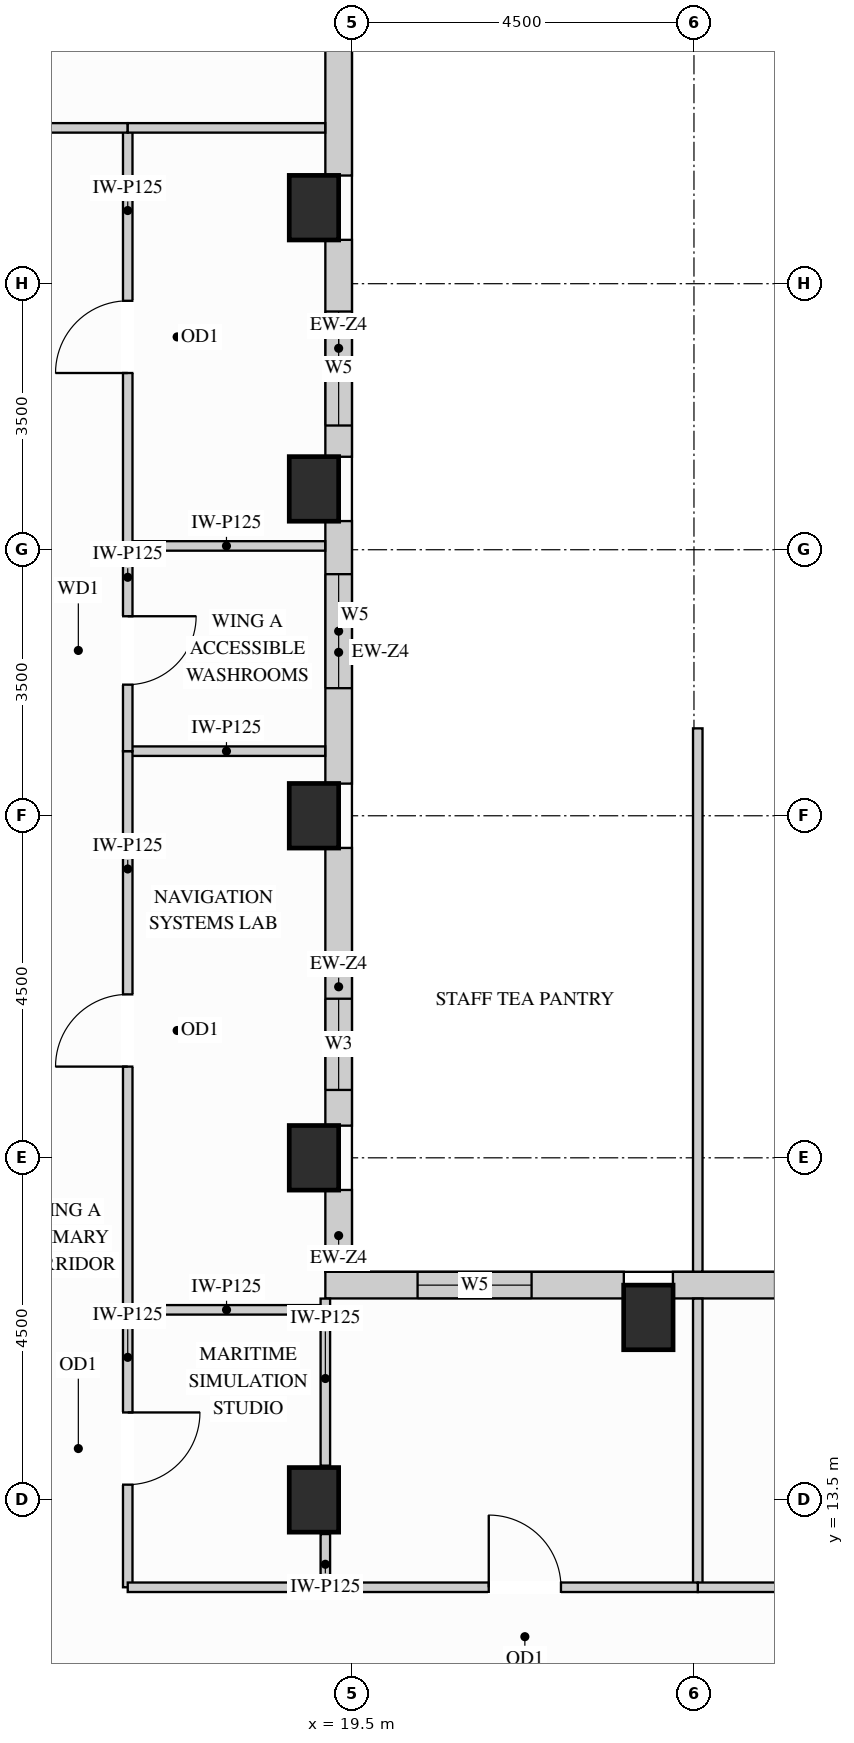
"""IFC4 building model, lengths in metres.
Left out: names, types, materials, properties, quantities, classifications, styles, units other than length and angle.
Written with IfcOpenShell. Run it as: python <this file> out.ifc"""

import sys

from ifc_helpers import new_model, si_unit, direction, frame, frame_2d, origin, origin_2d, place, context, subcontext, project, spatial, rectangle, extrude, source, transform, mapped, element, fill, save


model = new_model("IFC4")
c1 = context("Model", 3, precision=1e-05, world=origin(), true_north=direction((0.0, 1.0)))
c2 = subcontext(c1, "Body", "Model", "MODEL_VIEW")
j1 = project(units=[si_unit("LENGTHUNIT", "METRE"), si_unit("PLANEANGLEUNIT", "RADIAN")], contexts=[c1])
p1 = place(None, origin())
s1 = spatial("IfcSite", under=j1, at=p1, CompositionType="ELEMENT")
p2 = place(p1, origin())
s2 = spatial("IfcBuilding", under=s1, at=p2, CompositionType="ELEMENT")
p3 = place(p2, frame((0.0, 0.0, 234.0)))
s3 = spatial("IfcBuildingStorey", under=s2, at=p3, CompositionType="ELEMENT", Elevation=234.0)
m1 = source(origin(), c2, "Body", "SweptSolid", [
    extrude(rectangle(XDim=0.65, YDim=0.85, at=origin_2d()), origin(), (0.0, 0.0, 1.0), 3.4),
])
for number, where, z_axis, x_axis in (
    (1, (19.0, 13.5, 0.0), (0.0, 0.0, 1.0), (1.0, 0.0, 0.0)),
    (2, (19.0, 18.0, 0.0), (0.0, 0.0, 1.0), (1.0, 0.0, 0.0)),
    (3, (19.0, 22.5, 0.0), (0.0, 0.0, 1.0), (1.0, 0.0, 0.0)),
    (4, (19.0, 26.8, 0.0), (0.0, 0.0, 1.0), (1.0, 0.0, 0.0)),
    (5, (19.0, 30.5, 0.0), (0.0, 0.0, 1.0), (1.0, 0.0, 0.0)),
    (6, (23.4, 15.9, 0.0), (0.0, 0.0, 1.0), (1.0, 0.0, 0.0)),
):
    element("IfcColumn", number, at=place(p3, frame(where, z_axis=z_axis, x_axis=x_axis)), inside=s3, PredefinedType="COLUMN", context=c2, shape_type="MappedRepresentation", body=[
        mapped(m1, transform((0.0, 0.0, 0.0), x_axis=(1.0, 0.0, 0.0), y_axis=(0.0, 1.0, 0.0), z_axis=(0.0, 0.0, 1.0))),
    ])
m2 = source(origin(), c2, "Body", "SweptSolid", [
    extrude(rectangle(XDim=1.079, YDim=0.35, at=frame_2d((0.54, 0.0))), origin(), (0.0, 0.0, 1.0), 2.619),
])
p4 = place(p3, frame((19.325, 16.498, 0.0), z_axis=(0.0, 0.0, 1.0), x_axis=(0.0, 1.0, 0.0)))
e7 = element("IfcWall", 7, at=p4, inside=s3, PredefinedType="SOLIDWALL", context=c2, shape_type="MappedRepresentation", body=[
    mapped(m2, transform((0.0, 0.0, 0.0), x_axis=(1.0, 0.0, 0.0), y_axis=(0.0, 1.0, 0.0), z_axis=(0.0, 0.0, 1.0))),
])
p5 = place(p3, frame((19.325, 18.423, 0.0), z_axis=(0.0, 0.0, 1.0), x_axis=(0.0, 1.0, 0.0)))
e8 = element("IfcWall", 8, at=p5, inside=s3, PredefinedType="SOLIDWALL", context=c2, shape_type="SweptSolid", body=[
    extrude(rectangle(XDim=3.654, YDim=0.35, at=frame_2d((1.827, 0.0))), origin(), (0.0, 0.0, 1.0), 2.619),
])
p6 = place(p5, frame((0.47, 0.0, 0.78)))
e9 = element("IfcOpeningElement", 9, at=p6, cuts=e8, PredefinedType="OPENING", context=c2, shape_type="SweptSolid", body=[
    extrude(rectangle(XDim=1.2, YDim=1.659, at=frame_2d((0.6, 0.83))), frame((0.0, 0.185, 0.0), z_axis=(0.0, -1.0, 0.0), x_axis=(1.0, 0.0, 0.0)), (0.0, 0.0, 1.0), 0.37),
])
p7 = place(p3, frame((19.325, 22.923, 0.0), z_axis=(0.0, 0.0, 1.0), x_axis=(0.0, 1.0, 0.0)))
e10 = element("IfcWall", 10, at=p7, inside=s3, PredefinedType="SOLIDWALL", context=c2, shape_type="SweptSolid", body=[
    extrude(rectangle(XDim=3.454, YDim=0.35, at=frame_2d((1.727, 0.0))), origin(), (0.0, 0.0, 1.0), 2.619),
])
p8 = place(p7, frame((1.256, 0.0, 0.78)))
e11 = element("IfcOpeningElement", 11, at=p8, cuts=e10, PredefinedType="OPENING", context=c2, shape_type="SweptSolid", body=[
    extrude(rectangle(XDim=1.5, YDim=1.659, at=frame_2d((0.75, 0.83))), frame((0.0, 0.185, 0.0), z_axis=(0.0, -1.0, 0.0), x_axis=(1.0, 0.0, 0.0)), (0.0, 0.0, 1.0), 0.37),
])
p9 = place(p3, frame((19.325, 27.223, 0.0), z_axis=(0.0, 0.0, 1.0), x_axis=(0.0, 1.0, 0.0)))
e12 = element("IfcWall", 12, at=p9, inside=s3, PredefinedType="SOLIDWALL", context=c2, shape_type="SweptSolid", body=[
    extrude(rectangle(XDim=2.854, YDim=0.35, at=frame_2d((1.427, 0.0))), origin(), (0.0, 0.0, 1.0), 2.619),
])
p10 = place(p9, frame((0.411, 0.0, 0.78)))
e13 = element("IfcOpeningElement", 13, at=p10, cuts=e12, PredefinedType="OPENING", context=c2, shape_type="SweptSolid", body=[
    extrude(rectangle(XDim=1.5, YDim=1.659, at=frame_2d((0.75, 0.83))), frame((0.0, 0.185, 0.0), z_axis=(0.0, -1.0, 0.0), x_axis=(1.0, 0.0, 0.0)), (0.0, 0.0, 1.0), 0.37),
])
m3 = source(origin(), c2, "Body", "SweptSolid", [
    extrude(rectangle(XDim=3.654, YDim=0.35, at=frame_2d((1.827, 0.0))), origin(), (0.0, 0.0, 1.0), 2.619),
])
p11 = place(p3, frame((19.325, 30.923, 0.0), z_axis=(0.0, 0.0, 1.0), x_axis=(0.0, 1.0, 0.0)))
e14 = element("IfcWall", 14, at=p11, inside=s3, PredefinedType="SOLIDWALL", context=c2, shape_type="MappedRepresentation", body=[
    mapped(m3, transform((0.0, 0.0, 0.0), x_axis=(1.0, 0.0, 0.0), y_axis=(0.0, 1.0, 0.0), z_axis=(0.0, 0.0, 1.0))),
])
p12 = place(p3, frame((30.177, 16.325, 0.0), z_axis=(0.0, 0.0, 1.0), x_axis=(-1.0, 0.0, 0.0)))
e15 = element("IfcWall", 15, at=p12, inside=s3, PredefinedType="SOLIDWALL", context=c2, shape_type="SweptSolid", body=[
    extrude(rectangle(XDim=6.454, YDim=0.35, at=frame_2d((3.227, 0.0))), origin(), (0.0, 0.0, 1.0), 3.385),
])
p13 = place(p12, frame((1.344, 0.0, 0.78)))
e16 = element("IfcOpeningElement", 16, at=p13, cuts=e15, PredefinedType="OPENING", context=c2, shape_type="SweptSolid", body=[
    extrude(rectangle(XDim=1.5, YDim=2.0, at=frame_2d((0.75, 1.0))), frame((0.0, 0.185, 0.0), z_axis=(0.0, -1.0, 0.0), x_axis=(1.0, 0.0, 0.0)), (0.0, 0.0, 1.0), 0.37),
])
p14 = place(p12, frame((3.61, 0.0, 0.78)))
e17 = element("IfcOpeningElement", 17, at=p14, cuts=e15, PredefinedType="OPENING", context=c2, shape_type="SweptSolid", body=[
    extrude(rectangle(XDim=1.5, YDim=2.0, at=frame_2d((0.75, 1.0))), frame((0.0, 0.185, 0.0), z_axis=(0.0, -1.0, 0.0), x_axis=(1.0, 0.0, 0.0)), (0.0, 0.0, 1.0), 0.37),
])
p15 = place(p3, frame((23.077, 16.325, 0.0), z_axis=(0.0, 0.0, 1.0), x_axis=(-1.0, 0.0, 0.0)))
e18 = element("IfcWall", 18, at=p15, inside=s3, PredefinedType="SOLIDWALL", context=c2, shape_type="SweptSolid", body=[
    extrude(rectangle(XDim=3.927, YDim=0.35, at=frame_2d((1.963, 0.0))), origin(), (0.0, 0.0, 1.0), 3.385),
])
p16 = place(p15, frame((1.213, 0.0, 0.78)))
e19 = element("IfcOpeningElement", 19, at=p16, cuts=e18, PredefinedType="OPENING", context=c2, shape_type="SweptSolid", body=[
    extrude(rectangle(XDim=1.5, YDim=2.0, at=frame_2d((0.75, 1.0))), frame((0.0, 0.185, 0.0), z_axis=(0.0, -1.0, 0.0), x_axis=(1.0, 0.0, 0.0)), (0.0, 0.0, 1.0), 0.37),
])
m4 = source(origin(), c2, "Body", "SweptSolid", [
    extrude(rectangle(XDim=2.6, YDim=0.125, at=frame_2d((1.3, 0.0))), origin(), (0.0, 0.0, 1.0), 3.385),
])
p17 = place(p3, frame((16.55, 16.0, 0.0), z_axis=(0.0, 0.0, 1.0), x_axis=(1.0, 0.0, 0.0)))
e20 = element("IfcWall", 20, at=p17, inside=s3, PredefinedType="PARTITIONING", context=c2, shape_type="MappedRepresentation", body=[
    mapped(m4, transform((0.0, 0.0, 0.0), x_axis=(1.0, 0.0, 0.0), y_axis=(0.0, 1.0, 0.0), z_axis=(0.0, 0.0, 1.0))),
])
m5 = source(origin(), c2, "Body", "SweptSolid", [
    extrude(rectangle(XDim=2.598, YDim=0.125, at=frame_2d((1.299, 0.0))), origin(), (0.0, 0.0, 1.0), 3.385),
])
for number, where, z_axis, x_axis in (
    (21, (16.55, 23.35, 0.0), (0.0, 0.0, 1.0), (1.0, 0.0, 0.0)),
    (22, (16.55, 26.05, 0.0), (0.0, 0.0, 1.0), (1.0, 0.0, 0.0)),
):
    element("IfcWall", number, at=place(p3, frame(where, z_axis=z_axis, x_axis=x_axis)), inside=s3, PredefinedType="PARTITIONING", context=c2, shape_type="MappedRepresentation", body=[
        mapped(m5, transform((0.0, 0.0, 0.0), x_axis=(1.0, 0.0, 0.0), y_axis=(0.0, 1.0, 0.0), z_axis=(0.0, 0.0, 1.0))),
    ])
m6 = source(origin(), c2, "Body", "SweptSolid", [
    extrude(rectangle(XDim=0.7, YDim=0.125, at=frame_2d((0.35, 0.0))), origin(), (0.0, 0.0, 1.0), 2.773),
])
p18 = place(p3, frame((19.15, 12.35, 0.0), z_axis=(0.0, 0.0, 1.0), x_axis=(0.0, 1.0, 0.0)))
e23 = element("IfcWall", 23, at=p18, inside=s3, PredefinedType="PARTITIONING", context=c2, shape_type="MappedRepresentation", body=[
    mapped(m6, transform((0.0, 0.0, 0.0), x_axis=(1.0, 0.0, 0.0), y_axis=(0.0, 1.0, 0.0), z_axis=(0.0, 0.0, 1.0))),
])
m7 = source(origin(), c2, "Body", "SweptSolid", [
    extrude(rectangle(XDim=2.198, YDim=0.125, at=frame_2d((1.099, 0.0))), origin(), (0.0, 0.0, 1.0), 2.619),
])
p19 = place(p3, frame((19.15, 13.95, 0.0), z_axis=(0.0, 0.0, 1.0), x_axis=(0.0, 1.0, 0.0)))
e24 = element("IfcWall", 24, at=p19, inside=s3, PredefinedType="PARTITIONING", context=c2, shape_type="MappedRepresentation", body=[
    mapped(m7, transform((0.0, 0.0, 0.0), x_axis=(1.0, 0.0, 0.0), y_axis=(0.0, 1.0, 0.0), z_axis=(0.0, 0.0, 1.0))),
])
p20 = place(p3, frame((16.55, 12.35, 0.0), z_axis=(0.0, 0.0, 1.0), x_axis=(0.0, 1.0, 0.0)))
e25 = element("IfcWall", 25, at=p20, inside=s3, PredefinedType="PARTITIONING", context=c2, shape_type="SweptSolid", body=[
    extrude(rectangle(XDim=3.65, YDim=0.125, at=frame_2d((1.825, 0.0))), origin(), (0.0, 0.0, 1.0), 3.385),
])
p21 = place(p20, frame((1.35, 0.0, 0.0)))
e26 = element("IfcOpeningElement", 26, at=p21, cuts=e25, PredefinedType="OPENING", context=c2, shape_type="SweptSolid", body=[
    extrude(rectangle(XDim=0.95, YDim=2.15, at=frame_2d((0.475, 1.075))), frame((0.0, 0.073, 0.0), z_axis=(0.0, -1.0, 0.0), x_axis=(1.0, 0.0, 0.0)), (0.0, 0.0, 1.0), 0.145),
])
p22 = place(p3, frame((16.55, 16.0, 0.0), z_axis=(0.0, 0.0, 1.0), x_axis=(0.0, 1.0, 0.0)))
e27 = element("IfcWall", 27, at=p22, inside=s3, PredefinedType="PARTITIONING", context=c2, shape_type="SweptSolid", body=[
    extrude(rectangle(XDim=7.35, YDim=0.125, at=frame_2d((3.675, 0.0))), origin(), (0.0, 0.0, 1.0), 3.385),
])
p23 = place(p22, frame((3.2, 0.0, 0.0)))
e28 = element("IfcOpeningElement", 28, at=p23, cuts=e27, PredefinedType="OPENING", context=c2, shape_type="SweptSolid", body=[
    extrude(rectangle(XDim=0.95, YDim=2.15, at=frame_2d((0.475, 1.075))), frame((0.0, 0.073, 0.0), z_axis=(0.0, -1.0, 0.0), x_axis=(1.0, 0.0, 0.0)), (0.0, 0.0, 1.0), 0.145),
])
p24 = place(p3, frame((16.55, 26.05, 0.0), z_axis=(0.0, 0.0, 1.0), x_axis=(0.0, 1.0, 0.0)))
e29 = element("IfcWall", 29, at=p24, inside=s3, PredefinedType="PARTITIONING", context=c2, shape_type="SweptSolid", body=[
    extrude(rectangle(XDim=5.5, YDim=0.125, at=frame_2d((2.75, 0.0))), origin(), (0.0, 0.0, 1.0), 3.385),
])
p25 = place(p24, frame((2.275, 0.0, 0.0)))
e30 = element("IfcOpeningElement", 30, at=p25, cuts=e29, PredefinedType="OPENING", context=c2, shape_type="SweptSolid", body=[
    extrude(rectangle(XDim=0.95, YDim=2.15, at=frame_2d((0.475, 1.075))), frame((0.0, 0.073, 0.0), z_axis=(0.0, -1.0, 0.0), x_axis=(1.0, 0.0, 0.0)), (0.0, 0.0, 1.0), 0.145),
])
p26 = place(p3, frame((16.55, 23.35, 0.0), z_axis=(0.0, 0.0, 1.0), x_axis=(0.0, 1.0, 0.0)))
e31 = element("IfcWall", 31, at=p26, inside=s3, PredefinedType="PARTITIONING", context=c2, shape_type="SweptSolid", body=[
    extrude(rectangle(XDim=2.7, YDim=0.125, at=frame_2d((1.35, 0.0))), origin(), (0.0, 0.0, 1.0), 3.385),
])
p27 = place(p26, frame((0.875, 0.0, 0.0)))
e32 = element("IfcOpeningElement", 32, at=p27, cuts=e31, PredefinedType="OPENING", context=c2, shape_type="SweptSolid", body=[
    extrude(rectangle(XDim=0.9, YDim=2.15, at=frame_2d((0.45, 1.075))), frame((0.0, 0.073, 0.0), z_axis=(0.0, -1.0, 0.0), x_axis=(1.0, 0.0, 0.0)), (0.0, 0.0, 1.0), 0.145),
])
p28 = place(p3, frame((2.45, 31.55, 0.0), z_axis=(0.0, 0.0, 1.0), x_axis=(1.0, 0.0, 0.0)))
e33 = element("IfcWall", 33, at=p28, inside=s3, PredefinedType="PARTITIONING", context=c2, shape_type="SweptSolid", body=[
    extrude(rectangle(XDim=14.1, YDim=0.125, at=frame_2d((7.05, 0.0))), origin(), (0.0, 0.0, 1.0), 3.385),
])
p29 = place(p28, frame((6.575, 0.0, 0.0)))
e34 = element("IfcOpeningElement", 34, at=p29, cuts=e33, PredefinedType="OPENING", context=c2, shape_type="SweptSolid", body=[
    extrude(rectangle(XDim=0.95, YDim=2.15, at=frame_2d((0.475, 1.075))), frame((0.0, 0.073, 0.0), z_axis=(0.0, -1.0, 0.0), x_axis=(1.0, 0.0, 0.0)), (0.0, 0.0, 1.0), 0.145),
])
p30 = place(p3, frame((16.55, 31.55, 0.0), z_axis=(0.0, 0.0, 1.0), x_axis=(1.0, 0.0, 0.0)))
e35 = element("IfcWall", 35, at=p30, inside=s3, PredefinedType="PARTITIONING", context=c2, shape_type="MappedRepresentation", body=[
    mapped(m5, transform((0.0, 0.0, 0.0), x_axis=(1.0, 0.0, 0.0), y_axis=(0.0, 1.0, 0.0), z_axis=(0.0, 0.0, 1.0))),
])
m8 = source(origin(), c2, "Body", "SweptSolid", [
    extrude(rectangle(XDim=3.798, YDim=0.125, at=frame_2d((1.899, 0.0))), origin(), (0.0, 0.0, 1.0), 3.385),
])
p31 = place(p3, frame((24.05, 12.35, 0.0), z_axis=(0.0, 0.0, 1.0), x_axis=(0.0, 1.0, 0.0)))
e36 = element("IfcWall", 36, at=p31, inside=s3, PredefinedType="PARTITIONING", context=c2, shape_type="MappedRepresentation", body=[
    mapped(m8, transform((0.0, 0.0, 0.0), x_axis=(1.0, 0.0, 0.0), y_axis=(0.0, 1.0, 0.0), z_axis=(0.0, 0.0, 1.0))),
])
m9 = source(origin(), c2, "Body", "SweptSolid", [
    extrude(rectangle(XDim=7.148, YDim=0.125, at=frame_2d((3.574, 0.0))), origin(), (0.0, 0.0, 1.0), 3.385),
])
p32 = place(p3, frame((24.05, 16.502, 0.0), z_axis=(0.0, 0.0, 1.0), x_axis=(0.0, 1.0, 0.0)))
e37 = element("IfcWall", 37, at=p32, inside=s3, PredefinedType="PARTITIONING", context=c2, shape_type="MappedRepresentation", body=[
    mapped(m9, transform((0.0, 0.0, 0.0), x_axis=(1.0, 0.0, 0.0), y_axis=(0.0, 1.0, 0.0), z_axis=(0.0, 0.0, 1.0))),
])
p33 = place(p3, frame((24.05, 12.35, 0.0), z_axis=(0.0, 0.0, 1.0), x_axis=(1.0, 0.0, 0.0)))
e38 = element("IfcWall", 38, at=p33, inside=s3, PredefinedType="PARTITIONING", context=c2, shape_type="SweptSolid", body=[
    extrude(rectangle(XDim=5.8, YDim=0.125, at=frame_2d((2.9, 0.0))), origin(), (0.0, 0.0, 1.0), 3.385),
])
p34 = place(p33, frame((2.425, 0.0, 0.0)))
e39 = element("IfcOpeningElement", 39, at=p34, cuts=e38, PredefinedType="OPENING", context=c2, shape_type="SweptSolid", body=[
    extrude(rectangle(XDim=0.95, YDim=2.15, at=frame_2d((0.475, 1.075))), frame((0.0, 0.073, 0.0), z_axis=(0.0, -1.0, 0.0), x_axis=(1.0, 0.0, 0.0)), (0.0, 0.0, 1.0), 0.145),
])
m10 = source(origin(), c2, "Body", "SweptSolid", [
    extrude(rectangle(XDim=2.95, YDim=0.125, at=frame_2d((1.475, 0.0))), origin(), (0.0, 0.0, 1.0), 3.385),
])
p35 = place(p3, frame((16.55, 12.35, 0.0), z_axis=(0.0, 0.0, 1.0), x_axis=(1.0, 0.0, 0.0)))
e40 = element("IfcWall", 40, at=p35, inside=s3, PredefinedType="PARTITIONING", context=c2, shape_type="MappedRepresentation", body=[
    mapped(m10, transform((0.0, 0.0, 0.0), x_axis=(1.0, 0.0, 0.0), y_axis=(0.0, 1.0, 0.0), z_axis=(0.0, 0.0, 1.0))),
])
p36 = place(p3, frame((19.5, 12.35, 0.0), z_axis=(0.0, 0.0, 1.0), x_axis=(1.0, 0.0, 0.0)))
e41 = element("IfcWall", 41, at=p36, inside=s3, PredefinedType="PARTITIONING", context=c2, shape_type="SweptSolid", body=[
    extrude(rectangle(XDim=4.55, YDim=0.125, at=frame_2d((2.275, 0.0))), origin(), (0.0, 0.0, 1.0), 3.385),
])
p37 = place(p36, frame((1.8, 0.0, 0.0)))
e42 = element("IfcOpeningElement", 42, at=p37, cuts=e41, PredefinedType="OPENING", context=c2, shape_type="SweptSolid", body=[
    extrude(rectangle(XDim=0.95, YDim=2.15, at=frame_2d((0.475, 1.075))), frame((0.0, 0.073, 0.0), z_axis=(0.0, -1.0, 0.0), x_axis=(1.0, 0.0, 0.0)), (0.0, 0.0, 1.0), 0.145),
])
m11 = source(origin(), c2, "Body", "SweptSolid", [
    extrude(rectangle(XDim=0.95, YDim=2.15, at=frame_2d((0.475, 1.075))), frame((0.0, 0.025, 0.0), z_axis=(0.0, -1.0, 0.0), x_axis=(1.0, 0.0, 0.0)), (0.0, 0.0, 1.0), 0.05),
])
p38 = place(p21, origin())
e43 = element("IfcDoor", 43, at=p38, inside=s3, OperationType="SINGLE_SWING_RIGHT", PredefinedType="DOOR", context=c2, shape_type="MappedRepresentation", body=[
    mapped(m11, transform((0.0, 0.0, 0.0), x_axis=(1.0, 0.0, 0.0), y_axis=(0.0, 1.0, 0.0), z_axis=(0.0, 0.0, 1.0))),
])
fill(e26, e43)
p39 = place(p23, origin())
e44 = element("IfcDoor", 44, at=p39, inside=s3, OperationType="SINGLE_SWING_LEFT", PredefinedType="DOOR", context=c2, shape_type="MappedRepresentation", body=[
    mapped(m11, transform((0.0, 0.0, 0.0), x_axis=(1.0, 0.0, 0.0), y_axis=(0.0, 1.0, 0.0), z_axis=(0.0, 0.0, 1.0))),
])
fill(e28, e44)
p40 = place(p25, origin())
e45 = element("IfcDoor", 45, at=p40, inside=s3, OperationType="SINGLE_SWING_LEFT", PredefinedType="DOOR", context=c2, shape_type="MappedRepresentation", body=[
    mapped(m11, transform((0.0, 0.0, 0.0), x_axis=(1.0, 0.0, 0.0), y_axis=(0.0, 1.0, 0.0), z_axis=(0.0, 0.0, 1.0))),
])
fill(e30, e45)
p41 = place(p37, origin())
e46 = element("IfcDoor", 46, at=p41, inside=s3, OperationType="SINGLE_SWING_LEFT", PredefinedType="DOOR", context=c2, shape_type="MappedRepresentation", body=[
    mapped(m11, transform((0.0, 0.0, 0.0), x_axis=(1.0, 0.0, 0.0), y_axis=(0.0, 1.0, 0.0), z_axis=(0.0, 0.0, 1.0))),
])
fill(e42, e46)
m12 = source(origin(), c2, "Body", "SweptSolid", [
    extrude(rectangle(XDim=0.9, YDim=2.15, at=frame_2d((0.45, 1.075))), frame((0.0, 0.025, 0.0), z_axis=(0.0, -1.0, 0.0), x_axis=(1.0, 0.0, 0.0)), (0.0, 0.0, 1.0), 0.05),
])
p42 = place(p27, origin())
e47 = element("IfcDoor", 47, at=p42, inside=s3, OperationType="SINGLE_SWING_RIGHT", PredefinedType="DOOR", context=c2, shape_type="MappedRepresentation", body=[
    mapped(m12, transform((0.0, 0.0, 0.0), x_axis=(1.0, 0.0, 0.0), y_axis=(0.0, 1.0, 0.0), z_axis=(0.0, 0.0, 1.0))),
])
fill(e32, e47)
m13 = source(origin(), c2, "Body", "SweptSolid", [
    extrude(rectangle(XDim=1.2, YDim=1.659, at=frame_2d((0.6, 0.83))), frame((0.0, 0.03, 0.0), z_axis=(0.0, -1.0, 0.0), x_axis=(1.0, 0.0, 0.0)), (0.0, 0.0, 1.0), 0.06),
])
p43 = place(p6, origin())
e48 = element("IfcWindow", 48, at=p43, inside=s3, PartitioningType="SINGLE_PANEL", PredefinedType="WINDOW", context=c2, shape_type="MappedRepresentation", body=[
    mapped(m13, transform((0.0, 0.0, 0.0), x_axis=(1.0, 0.0, 0.0), y_axis=(0.0, 1.0, 0.0), z_axis=(0.0, 0.0, 1.0))),
])
fill(e9, e48)
m14 = source(origin(), c2, "Body", "SweptSolid", [
    extrude(rectangle(XDim=1.5, YDim=1.659, at=frame_2d((0.75, 0.83))), frame((0.0, 0.03, 0.0), z_axis=(0.0, -1.0, 0.0), x_axis=(1.0, 0.0, 0.0)), (0.0, 0.0, 1.0), 0.06),
])
p44 = place(p8, origin())
e49 = element("IfcWindow", 49, at=p44, inside=s3, PartitioningType="SINGLE_PANEL", PredefinedType="WINDOW", context=c2, shape_type="MappedRepresentation", body=[
    mapped(m14, transform((0.0, 0.0, 0.0), x_axis=(1.0, 0.0, 0.0), y_axis=(0.0, 1.0, 0.0), z_axis=(0.0, 0.0, 1.0))),
])
fill(e11, e49)
p45 = place(p10, origin())
e50 = element("IfcWindow", 50, at=p45, inside=s3, PartitioningType="SINGLE_PANEL", PredefinedType="WINDOW", context=c2, shape_type="MappedRepresentation", body=[
    mapped(m14, transform((0.0, 0.0, 0.0), x_axis=(1.0, 0.0, 0.0), y_axis=(0.0, 1.0, 0.0), z_axis=(0.0, 0.0, 1.0))),
])
fill(e13, e50)
m15 = source(origin(), c2, "Body", "SweptSolid", [
    extrude(rectangle(XDim=1.5, YDim=2.0, at=frame_2d((0.75, 1.0))), frame((0.0, 0.03, 0.0), z_axis=(0.0, -1.0, 0.0), x_axis=(1.0, 0.0, 0.0)), (0.0, 0.0, 1.0), 0.06),
])
p46 = place(p16, origin())
e51 = element("IfcWindow", 51, at=p46, inside=s3, PartitioningType="SINGLE_PANEL", PredefinedType="WINDOW", context=c2, shape_type="MappedRepresentation", body=[
    mapped(m15, transform((0.0, 0.0, 0.0), x_axis=(1.0, 0.0, 0.0), y_axis=(0.0, 1.0, 0.0), z_axis=(0.0, 0.0, 1.0))),
])
fill(e19, e51)
save(model, sys.argv[1])
